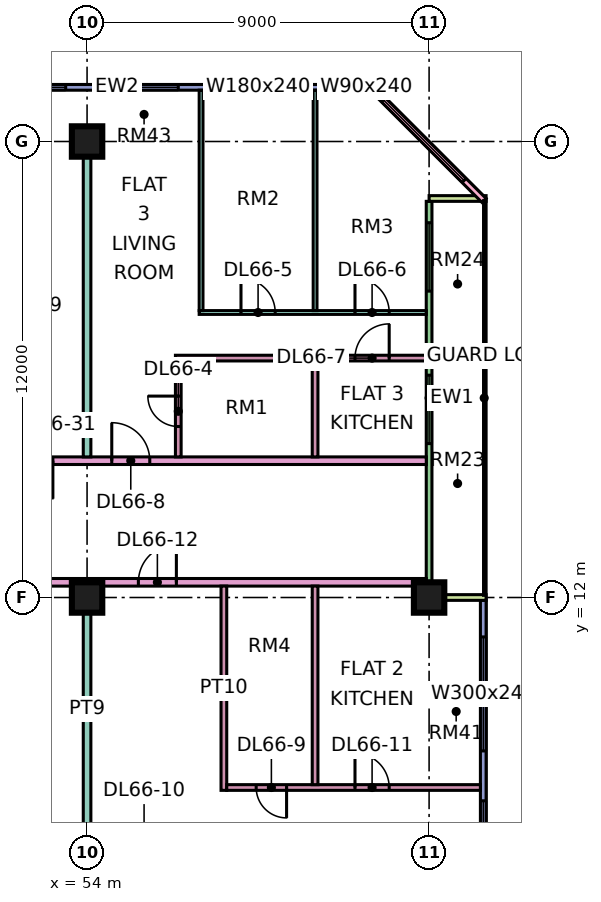
"""IFC4 building model, lengths in metres.
Left out: names, types, materials, properties, quantities, classifications, styles, units other than length and angle.
Written with IfcOpenShell. Run it as: python <this file> out.ifc"""

import sys

from ifc_helpers import new_model, si_unit, direction, frame, frame_2d, origin, origin_2d, place, context, subcontext, project, spatial, rectangle, extrude, element, fill, save


model = new_model("IFC4")
c1 = context("Model", 3, precision=1e-05, world=origin(), true_north=direction((0.0, 1.0)))
c2 = subcontext(c1, "Body", "Model", "MODEL_VIEW")
j1 = project(units=[si_unit("LENGTHUNIT", "METRE"), si_unit("PLANEANGLEUNIT", "RADIAN")], contexts=[c1])
p1 = place(None, origin())
s1 = spatial("IfcSite", under=j1, at=p1, CompositionType="ELEMENT")
p2 = place(p1, origin())
s2 = spatial("IfcBuilding", under=s1, at=p2, CompositionType="ELEMENT")
p3 = place(p2, frame((0.0, 0.0, 284.65)))
s3 = spatial("IfcBuildingStorey", under=s2, at=p3, CompositionType="ELEMENT", Elevation=284.65)
for number, where, z_axis, x_axis in (
    (1, (54.0, 12.0, 0.0), (0.0, 0.0, 1.0), (1.0, 0.0, 0.0)),
    (2, (54.0, 24.0, 0.0), (0.0, 0.0, 1.0), (1.0, 0.0, 0.0)),
    (3, (63.0, 12.0, 0.0), (0.0, 0.0, 1.0), (1.0, 0.0, 0.0)),
):
    element("IfcColumn", number, at=place(p3, frame(where, z_axis=z_axis, x_axis=x_axis)), inside=s3, PredefinedType="COLUMN", context=c2, shape_type="SweptSolid", body=[
        extrude(rectangle(XDim=0.8, YDim=0.8, at=origin_2d()), origin(), (0.0, 0.0, 1.0), 3.75),
    ])
p4 = place(p3, frame((61.5, 25.425, 0.0), z_axis=(0.0, 0.0, 1.0), x_axis=(-1.0, 0.0, 0.0)))
e4 = element("IfcWall", 4, at=p4, inside=s3, PredefinedType="SOLIDWALL", context=c2, shape_type="SweptSolid", body=[
    extrude(rectangle(XDim=13.425, YDim=0.15, at=frame_2d((6.712, 0.0))), origin(), (0.0, 0.0, 1.0), 3.35),
])
p5 = place(p4, frame((0.3, 0.0, 0.45)))
e5 = element("IfcOpeningElement", 5, at=p5, cuts=e4, PredefinedType="OPENING", context=c2, shape_type="SweptSolid", body=[
    extrude(rectangle(XDim=0.9, YDim=2.4, at=frame_2d((0.45, 1.2))), frame((0.0, 0.085, 0.0), z_axis=(0.0, -1.0, 0.0), x_axis=(1.0, 0.0, 0.0)), (0.0, 0.0, 1.0), 0.17),
])
p6 = place(p4, frame((2.1, 0.0, 0.45)))
e6 = element("IfcOpeningElement", 6, at=p6, cuts=e4, PredefinedType="OPENING", context=c2, shape_type="SweptSolid", body=[
    extrude(rectangle(XDim=1.8, YDim=2.4, at=frame_2d((0.9, 1.2))), frame((0.0, 0.085, 0.0), z_axis=(0.0, -1.0, 0.0), x_axis=(1.0, 0.0, 0.0)), (0.0, 0.0, 1.0), 0.17),
])
p7 = place(p4, frame((5.1, 0.0, 0.45)))
e7 = element("IfcOpeningElement", 7, at=p7, cuts=e4, PredefinedType="OPENING", context=c2, shape_type="SweptSolid", body=[
    extrude(rectangle(XDim=1.8, YDim=2.4, at=frame_2d((0.9, 1.2))), frame((0.0, 0.085, 0.0), z_axis=(0.0, -1.0, 0.0), x_axis=(1.0, 0.0, 0.0)), (0.0, 0.0, 1.0), 0.17),
])
p8 = place(p4, frame((8.062, 0.0, 0.45)))
e8 = element("IfcOpeningElement", 8, at=p8, cuts=e4, PredefinedType="OPENING", context=c2, shape_type="SweptSolid", body=[
    extrude(rectangle(XDim=4.8, YDim=2.4, at=frame_2d((2.4, 1.2))), frame((0.0, 0.085, 0.0), z_axis=(0.0, -1.0, 0.0), x_axis=(1.0, 0.0, 0.0)), (0.0, 0.0, 1.0), 0.17),
])
p9 = place(p3, frame((64.425, 1.5, 0.0), z_axis=(0.0, 0.0, 1.0), x_axis=(0.0, 1.0, 0.0)))
e9 = element("IfcWall", 9, at=p9, inside=s3, PredefinedType="SOLIDWALL", context=c2, shape_type="SweptSolid", body=[
    extrude(rectangle(XDim=10.425, YDim=0.15, at=frame_2d((5.212, 0.0))), origin(), (0.0, 0.0, 1.0), 3.35),
])
p10 = place(p9, frame((0.35, 0.0, 0.45)))
e10 = element("IfcOpeningElement", 10, at=p10, cuts=e9, PredefinedType="OPENING", context=c2, shape_type="SweptSolid", body=[
    extrude(rectangle(XDim=4.8, YDim=2.4, at=frame_2d((2.4, 1.2))), frame((0.0, 0.085, 0.0), z_axis=(0.0, -1.0, 0.0), x_axis=(1.0, 0.0, 0.0)), (0.0, 0.0, 1.0), 0.17),
])
p11 = place(p9, frame((6.462, 0.0, 0.45)))
e11 = element("IfcOpeningElement", 11, at=p11, cuts=e9, PredefinedType="OPENING", context=c2, shape_type="SweptSolid", body=[
    extrude(rectangle(XDim=3.0, YDim=2.4, at=frame_2d((1.5, 1.2))), frame((0.0, 0.085, 0.0), z_axis=(0.0, -1.0, 0.0), x_axis=(1.0, 0.0, 0.0)), (0.0, 0.0, 1.0), 0.17),
])
p12 = place(p3, frame((63.0, 12.075, 0.0), z_axis=(0.0, 0.0, 1.0), x_axis=(0.0, 1.0, 0.0)))
e12 = element("IfcWall", 12, at=p12, inside=s3, PredefinedType="SOLIDWALL", context=c2, shape_type="SweptSolid", body=[
    extrude(rectangle(XDim=10.35, YDim=0.15, at=frame_2d((5.175, 0.0))), origin(), (0.0, 0.0, 1.0), 3.35),
])
p13 = place(p12, frame((3.975, 0.0, 0.45)))
e13 = element("IfcOpeningElement", 13, at=p13, cuts=e12, PredefinedType="OPENING", context=c2, shape_type="SweptSolid", body=[
    extrude(rectangle(XDim=1.8, YDim=2.4, at=frame_2d((0.9, 1.2))), frame((0.0, 0.085, 0.0), z_axis=(0.0, -1.0, 0.0), x_axis=(1.0, 0.0, 0.0)), (0.0, 0.0, 1.0), 0.17),
])
p14 = place(p12, frame((7.988, 0.0, 0.45)))
e14 = element("IfcOpeningElement", 14, at=p14, cuts=e12, PredefinedType="OPENING", context=c2, shape_type="SweptSolid", body=[
    extrude(rectangle(XDim=1.8, YDim=2.4, at=frame_2d((0.9, 1.2))), frame((0.0, 0.085, 0.0), z_axis=(0.0, -1.0, 0.0), x_axis=(1.0, 0.0, 0.0)), (0.0, 0.0, 1.0), 0.17),
])
for number, where, z_axis, x_axis in (
    (15, (64.5, 12.0, 0.0), (0.0, 0.0, 1.0), (-1.0, 0.0, 0.0)),
    (16, (64.5, 22.5, 0.0), (0.0, 0.0, 1.0), (-1.0, 0.0, 0.0)),
):
    element("IfcWall", number, at=place(p3, frame(where, z_axis=z_axis, x_axis=x_axis)), inside=s3, PredefinedType="SOLIDWALL", context=c2, shape_type="SweptSolid", body=[
        extrude(rectangle(XDim=1.5, YDim=0.15, at=frame_2d((0.75, 0.0))), origin(), (0.0, 0.0, 1.0), 3.35),
    ])
p15 = place(p3, frame((64.447, 22.447, 0.0), z_axis=(0.0, 0.0, 1.0), x_axis=(-0.707106781187, 0.707106781187, 0.0)))
e17 = element("IfcWall", 17, at=p15, inside=s3, PredefinedType="SOLIDWALL", context=c2, shape_type="SweptSolid", body=[
    extrude(rectangle(XDim=4.243, YDim=0.15, at=frame_2d((2.121, 0.0))), origin(), (0.0, 0.0, 1.0), 3.35),
])
p16 = place(p15, frame((0.744, 0.0, 0.45)))
e18 = element("IfcOpeningElement", 18, at=p16, cuts=e17, PredefinedType="OPENING", context=c2, shape_type="SweptSolid", body=[
    extrude(rectangle(XDim=3.0, YDim=2.4, at=frame_2d((1.5, 1.2))), frame((0.0, 0.085, 0.0), z_axis=(0.0, -1.0, 0.0), x_axis=(1.0, 0.0, 0.0)), (0.0, 0.0, 1.0), 0.17),
])
p17 = place(p3, frame((40.65, 12.4, 0.0), z_axis=(0.0, 0.0, 1.0), x_axis=(1.0, 0.0, 0.0)))
e19 = element("IfcWall", 19, at=p17, inside=s3, PredefinedType="PARTITIONING", context=c2, shape_type="SweptSolid", body=[
    extrude(rectangle(XDim=22.276, YDim=0.2, at=frame_2d((11.138, 0.0))), origin(), (0.0, 0.0, 1.0), 3.35),
])
p18 = place(p17, frame((14.7, 0.0, 0.0)))
e20 = element("IfcOpeningElement", 20, at=p18, cuts=e19, PredefinedType="OPENING", context=c2, shape_type="SweptSolid", body=[
    extrude(rectangle(XDim=1.0, YDim=2.1, at=frame_2d((0.5, 1.05))), frame((0.0, 0.11, 0.0), z_axis=(0.0, -1.0, 0.0), x_axis=(1.0, 0.0, 0.0)), (0.0, 0.0, 1.0), 0.22),
])
p19 = place(p17, frame((1.05, 0.0, 0.0)))
e21 = element("IfcOpeningElement", 21, at=p19, cuts=e19, PredefinedType="OPENING", context=c2, shape_type="SweptSolid", body=[
    extrude(rectangle(XDim=1.0, YDim=2.1, at=frame_2d((0.5, 1.05))), frame((0.0, 0.11, 0.0), z_axis=(0.0, -1.0, 0.0), x_axis=(1.0, 0.0, 0.0)), (0.0, 0.0, 1.0), 0.22),
])
p20 = place(p3, frame((51.225, 15.6, 0.0), z_axis=(0.0, 0.0, 1.0), x_axis=(1.0, 0.0, 0.0)))
e22 = element("IfcWall", 22, at=p20, inside=s3, PredefinedType="PARTITIONING", context=c2, shape_type="SweptSolid", body=[
    extrude(rectangle(XDim=11.701, YDim=0.2, at=frame_2d((5.851, 0.0))), origin(), (0.0, 0.0, 1.0), 3.35),
])
p21 = place(p20, frame((3.425, 0.0, 0.0)))
e23 = element("IfcOpeningElement", 23, at=p21, cuts=e22, PredefinedType="OPENING", context=c2, shape_type="SweptSolid", body=[
    extrude(rectangle(XDim=1.0, YDim=2.1, at=frame_2d((0.5, 1.05))), frame((0.0, 0.11, 0.0), z_axis=(0.0, -1.0, 0.0), x_axis=(1.0, 0.0, 0.0)), (0.0, 0.0, 1.0), 0.22),
])
p22 = place(p20, frame((0.875, 0.0, 0.0)))
e24 = element("IfcOpeningElement", 24, at=p22, cuts=e22, PredefinedType="OPENING", context=c2, shape_type="SweptSolid", body=[
    extrude(rectangle(XDim=1.0, YDim=2.1, at=frame_2d((0.5, 1.05))), frame((0.0, 0.11, 0.0), z_axis=(0.0, -1.0, 0.0), x_axis=(1.0, 0.0, 0.0)), (0.0, 0.0, 1.0), 0.22),
])
p23 = place(p3, frame((54.0, 5.825, 0.0), z_axis=(0.0, 0.0, 1.0), x_axis=(0.0, 1.0, 0.0)))
e25 = element("IfcWall", 25, at=p23, inside=s3, PredefinedType="PARTITIONING", context=c2, shape_type="SweptSolid", body=[
    extrude(rectangle(XDim=6.475, YDim=0.2, at=frame_2d((3.238, 0.0))), origin(), (0.0, 0.0, 1.0), 3.35),
])
p24 = place(p3, frame((54.0, 15.7, 0.0), z_axis=(0.0, 0.0, 1.0), x_axis=(0.0, 1.0, 0.0)))
e26 = element("IfcWall", 26, at=p24, inside=s3, PredefinedType="PARTITIONING", context=c2, shape_type="SweptSolid", body=[
    extrude(rectangle(XDim=8.3, YDim=0.2, at=frame_2d((4.15, 0.0))), origin(), (0.0, 0.0, 1.0), 3.35),
])
p25 = place(p3, frame((56.325, 18.3, 0.0), z_axis=(0.0, 0.0, 1.0), x_axis=(1.0, 0.0, 0.0)))
e27 = element("IfcWall", 27, at=p25, inside=s3, PredefinedType="PARTITIONING", context=c2, shape_type="SweptSolid", body=[
    extrude(rectangle(XDim=6.601, YDim=0.15, at=frame_2d((3.301, 0.0))), origin(), (0.0, 0.0, 1.0), 3.35),
])
p26 = place(p25, frame((4.725, 0.0, 0.0)))
e28 = element("IfcOpeningElement", 28, at=p26, cuts=e27, PredefinedType="OPENING", context=c2, shape_type="SweptSolid", body=[
    extrude(rectangle(XDim=0.9, YDim=2.1, at=frame_2d((0.45, 1.05))), frame((0.0, 0.085, 0.0), z_axis=(0.0, -1.0, 0.0), x_axis=(1.0, 0.0, 0.0)), (0.0, 0.0, 1.0), 0.17),
])
p27 = place(p3, frame((56.4, 15.7, 0.0), z_axis=(0.0, 0.0, 1.0), x_axis=(0.0, 1.0, 0.0)))
e29 = element("IfcWall", 29, at=p27, inside=s3, PredefinedType="PARTITIONING", context=c2, shape_type="SweptSolid", body=[
    extrude(rectangle(XDim=2.525, YDim=0.15, at=frame_2d((1.263, 0.0))), origin(), (0.0, 0.0, 1.0), 3.35),
])
p28 = place(p27, frame((0.8, 0.0, 0.0)))
e30 = element("IfcOpeningElement", 30, at=p28, cuts=e29, PredefinedType="OPENING", context=c2, shape_type="SweptSolid", body=[
    extrude(rectangle(XDim=0.8, YDim=2.1, at=frame_2d((0.4, 1.05))), frame((0.0, 0.085, 0.0), z_axis=(0.0, -1.0, 0.0), x_axis=(1.0, 0.0, 0.0)), (0.0, 0.0, 1.0), 0.17),
])
p29 = place(p3, frame((56.95, 19.5, 0.0), z_axis=(0.0, 0.0, 1.0), x_axis=(1.0, 0.0, 0.0)))
e31 = element("IfcWall", 31, at=p29, inside=s3, PredefinedType="PARTITIONING", context=c2, shape_type="SweptSolid", body=[
    extrude(rectangle(XDim=5.976, YDim=0.1, at=frame_2d((2.988, 0.0))), origin(), (0.0, 0.0, 1.0), 3.35),
])
p30 = place(p29, frame((1.1, 0.0, 0.0)))
e32 = element("IfcOpeningElement", 32, at=p30, cuts=e31, PredefinedType="OPENING", context=c2, shape_type="SweptSolid", body=[
    extrude(rectangle(XDim=0.9, YDim=2.1, at=frame_2d((0.45, 1.05))), frame((0.0, 0.06, 0.0), z_axis=(0.0, -1.0, 0.0), x_axis=(1.0, 0.0, 0.0)), (0.0, 0.0, 1.0), 0.12),
])
p31 = place(p29, frame((4.1, 0.0, 0.0)))
e33 = element("IfcOpeningElement", 33, at=p31, cuts=e31, PredefinedType="OPENING", context=c2, shape_type="SweptSolid", body=[
    extrude(rectangle(XDim=0.9, YDim=2.1, at=frame_2d((0.45, 1.05))), frame((0.0, 0.06, 0.0), z_axis=(0.0, -1.0, 0.0), x_axis=(1.0, 0.0, 0.0)), (0.0, 0.0, 1.0), 0.12),
])
p32 = place(p3, frame((57.0, 19.55, 0.0), z_axis=(0.0, 0.0, 1.0), x_axis=(0.0, 1.0, 0.0)))
e34 = element("IfcWall", 34, at=p32, inside=s3, PredefinedType="PARTITIONING", context=c2, shape_type="SweptSolid", body=[
    extrude(rectangle(XDim=5.8, YDim=0.1, at=frame_2d((2.9, 0.0))), origin(), (0.0, 0.0, 1.0), 3.35),
])
p33 = place(p3, frame((57.6, 6.925, 0.0), z_axis=(0.0, 0.0, 1.0), x_axis=(0.0, 1.0, 0.0)))
e35 = element("IfcWall", 35, at=p33, inside=s3, PredefinedType="PARTITIONING", context=c2, shape_type="SweptSolid", body=[
    extrude(rectangle(XDim=5.375, YDim=0.15, at=frame_2d((2.688, 0.0))), origin(), (0.0, 0.0, 1.0), 3.35),
])
p34 = place(p3, frame((57.675, 7.0, 0.0), z_axis=(0.0, 0.0, 1.0), x_axis=(1.0, 0.0, 0.0)))
e36 = element("IfcWall", 36, at=p34, inside=s3, PredefinedType="PARTITIONING", context=c2, shape_type="SweptSolid", body=[
    extrude(rectangle(XDim=6.675, YDim=0.15, at=frame_2d((3.337, 0.0))), origin(), (0.0, 0.0, 1.0), 3.35),
])
p35 = place(p34, frame((0.775, 0.0, 0.0)))
e37 = element("IfcOpeningElement", 37, at=p35, cuts=e36, PredefinedType="OPENING", context=c2, shape_type="SweptSolid", body=[
    extrude(rectangle(XDim=0.8, YDim=2.1, at=frame_2d((0.4, 1.05))), frame((0.0, 0.085, 0.0), z_axis=(0.0, -1.0, 0.0), x_axis=(1.0, 0.0, 0.0)), (0.0, 0.0, 1.0), 0.17),
])
p36 = place(p34, frame((3.375, 0.0, 0.0)))
e38 = element("IfcOpeningElement", 38, at=p36, cuts=e36, PredefinedType="OPENING", context=c2, shape_type="SweptSolid", body=[
    extrude(rectangle(XDim=0.9, YDim=2.1, at=frame_2d((0.45, 1.05))), frame((0.0, 0.085, 0.0), z_axis=(0.0, -1.0, 0.0), x_axis=(1.0, 0.0, 0.0)), (0.0, 0.0, 1.0), 0.17),
])
p37 = place(p3, frame((60.0, 7.075, 0.0), z_axis=(0.0, 0.0, 1.0), x_axis=(0.0, 1.0, 0.0)))
e39 = element("IfcWall", 39, at=p37, inside=s3, PredefinedType="PARTITIONING", context=c2, shape_type="SweptSolid", body=[
    extrude(rectangle(XDim=5.225, YDim=0.15, at=frame_2d((2.613, 0.0))), origin(), (0.0, 0.0, 1.0), 3.35),
])
p38 = place(p3, frame((60.0, 15.7, 0.0), z_axis=(0.0, 0.0, 1.0), x_axis=(0.0, 1.0, 0.0)))
e40 = element("IfcWall", 40, at=p38, inside=s3, PredefinedType="PARTITIONING", context=c2, shape_type="SweptSolid", body=[
    extrude(rectangle(XDim=2.525, YDim=0.15, at=frame_2d((1.263, 0.0))), origin(), (0.0, 0.0, 1.0), 3.35),
])
p39 = place(p3, frame((60.0, 19.55, 0.0), z_axis=(0.0, 0.0, 1.0), x_axis=(0.0, 1.0, 0.0)))
e41 = element("IfcWall", 41, at=p39, inside=s3, PredefinedType="PARTITIONING", context=c2, shape_type="SweptSolid", body=[
    extrude(rectangle(XDim=5.801, YDim=0.1, at=frame_2d((2.9, 0.0))), origin(), (0.0, 0.0, 1.0), 3.35),
])
p40 = place(p5, origin())
e42 = element("IfcWindow", 42, at=p40, inside=s3, PartitioningType="SINGLE_PANEL", PredefinedType="WINDOW", context=c2, shape_type="SweptSolid", body=[
    extrude(rectangle(XDim=0.9, YDim=2.4, at=frame_2d((0.45, 1.2))), frame((0.0, 0.03, 0.0), z_axis=(0.0, -1.0, 0.0), x_axis=(1.0, 0.0, 0.0)), (0.0, 0.0, 1.0), 0.06),
])
fill(e5, e42)
p41 = place(p6, origin())
e43 = element("IfcWindow", 43, at=p41, inside=s3, PartitioningType="SINGLE_PANEL", PredefinedType="WINDOW", context=c2, shape_type="SweptSolid", body=[
    extrude(rectangle(XDim=1.8, YDim=2.4, at=frame_2d((0.9, 1.2))), frame((0.0, 0.03, 0.0), z_axis=(0.0, -1.0, 0.0), x_axis=(1.0, 0.0, 0.0)), (0.0, 0.0, 1.0), 0.06),
])
fill(e6, e43)
p42 = place(p7, origin())
e44 = element("IfcWindow", 44, at=p42, inside=s3, PartitioningType="SINGLE_PANEL", PredefinedType="WINDOW", context=c2, shape_type="SweptSolid", body=[
    extrude(rectangle(XDim=1.8, YDim=2.4, at=frame_2d((0.9, 1.2))), frame((0.0, 0.03, 0.0), z_axis=(0.0, -1.0, 0.0), x_axis=(1.0, 0.0, 0.0)), (0.0, 0.0, 1.0), 0.06),
])
fill(e7, e44)
p43 = place(p8, origin())
e45 = element("IfcWindow", 45, at=p43, inside=s3, PartitioningType="SINGLE_PANEL", PredefinedType="WINDOW", context=c2, shape_type="SweptSolid", body=[
    extrude(rectangle(XDim=4.8, YDim=2.4, at=frame_2d((2.4, 1.2))), frame((0.0, 0.03, 0.0), z_axis=(0.0, -1.0, 0.0), x_axis=(1.0, 0.0, 0.0)), (0.0, 0.0, 1.0), 0.06),
])
fill(e8, e45)
p44 = place(p10, origin())
e46 = element("IfcWindow", 46, at=p44, inside=s3, PartitioningType="SINGLE_PANEL", PredefinedType="WINDOW", context=c2, shape_type="SweptSolid", body=[
    extrude(rectangle(XDim=4.8, YDim=2.4, at=frame_2d((2.4, 1.2))), frame((0.0, 0.03, 0.0), z_axis=(0.0, -1.0, 0.0), x_axis=(1.0, 0.0, 0.0)), (0.0, 0.0, 1.0), 0.06),
])
fill(e10, e46)
p45 = place(p11, origin())
e47 = element("IfcWindow", 47, at=p45, inside=s3, PartitioningType="SINGLE_PANEL", PredefinedType="WINDOW", context=c2, shape_type="SweptSolid", body=[
    extrude(rectangle(XDim=3.0, YDim=2.4, at=frame_2d((1.5, 1.2))), frame((0.0, 0.03, 0.0), z_axis=(0.0, -1.0, 0.0), x_axis=(1.0, 0.0, 0.0)), (0.0, 0.0, 1.0), 0.06),
])
fill(e11, e47)
p46 = place(p13, origin())
e48 = element("IfcWindow", 48, at=p46, inside=s3, PartitioningType="SINGLE_PANEL", PredefinedType="WINDOW", context=c2, shape_type="SweptSolid", body=[
    extrude(rectangle(XDim=1.8, YDim=2.4, at=frame_2d((0.9, 1.2))), frame((0.0, 0.03, 0.0), z_axis=(0.0, -1.0, 0.0), x_axis=(1.0, 0.0, 0.0)), (0.0, 0.0, 1.0), 0.06),
])
fill(e13, e48)
p47 = place(p14, origin())
e49 = element("IfcWindow", 49, at=p47, inside=s3, PartitioningType="SINGLE_PANEL", PredefinedType="WINDOW", context=c2, shape_type="SweptSolid", body=[
    extrude(rectangle(XDim=1.8, YDim=2.4, at=frame_2d((0.9, 1.2))), frame((0.0, 0.03, 0.0), z_axis=(0.0, -1.0, 0.0), x_axis=(1.0, 0.0, 0.0)), (0.0, 0.0, 1.0), 0.06),
])
fill(e14, e49)
p48 = place(p16, origin())
e50 = element("IfcWindow", 50, at=p48, inside=s3, PartitioningType="SINGLE_PANEL", PredefinedType="WINDOW", context=c2, shape_type="SweptSolid", body=[
    extrude(rectangle(XDim=3.0, YDim=2.4, at=frame_2d((1.5, 1.2))), frame((0.0, 0.03, 0.0), z_axis=(0.0, -1.0, 0.0), x_axis=(1.0, 0.0, 0.0)), (0.0, 0.0, 1.0), 0.06),
])
fill(e18, e50)
p49 = place(p28, frame((0.8, 0.0, 0.0), z_axis=(0.0, 0.0, 1.0), x_axis=(-1.0, 0.0, 0.0)))
e51 = element("IfcDoor", 51, at=p49, inside=s3, OperationType="SINGLE_SWING_RIGHT", PredefinedType="DOOR", context=c2, shape_type="SweptSolid", body=[
    extrude(rectangle(XDim=0.8, YDim=2.1, at=frame_2d((0.4, 1.05))), frame((0.0, 0.025, 0.0), z_axis=(0.0, -1.0, 0.0), x_axis=(1.0, 0.0, 0.0)), (0.0, 0.0, 1.0), 0.05),
])
fill(e30, e51)
p50 = place(p30, origin())
e52 = element("IfcDoor", 52, at=p50, inside=s3, OperationType="SINGLE_SWING_LEFT", PredefinedType="DOOR", context=c2, shape_type="SweptSolid", body=[
    extrude(rectangle(XDim=0.9, YDim=2.1, at=frame_2d((0.45, 1.05))), frame((0.0, 0.025, 0.0), z_axis=(0.0, -1.0, 0.0), x_axis=(1.0, 0.0, 0.0)), (0.0, 0.0, 1.0), 0.05),
])
fill(e32, e52)
p51 = place(p31, origin())
e53 = element("IfcDoor", 53, at=p51, inside=s3, OperationType="SINGLE_SWING_LEFT", PredefinedType="DOOR", context=c2, shape_type="SweptSolid", body=[
    extrude(rectangle(XDim=0.9, YDim=2.1, at=frame_2d((0.45, 1.05))), frame((0.0, 0.025, 0.0), z_axis=(0.0, -1.0, 0.0), x_axis=(1.0, 0.0, 0.0)), (0.0, 0.0, 1.0), 0.05),
])
fill(e33, e53)
p52 = place(p26, frame((0.9, 0.0, 0.0), z_axis=(0.0, 0.0, 1.0), x_axis=(-1.0, 0.0, 0.0)))
e54 = element("IfcDoor", 54, at=p52, inside=s3, OperationType="SINGLE_SWING_RIGHT", PredefinedType="DOOR", context=c2, shape_type="SweptSolid", body=[
    extrude(rectangle(XDim=0.9, YDim=2.1, at=frame_2d((0.45, 1.05))), frame((0.0, 0.025, 0.0), z_axis=(0.0, -1.0, 0.0), x_axis=(1.0, 0.0, 0.0)), (0.0, 0.0, 1.0), 0.05),
])
fill(e28, e54)
p53 = place(p21, origin())
e55 = element("IfcDoor", 55, at=p53, inside=s3, OperationType="SINGLE_SWING_LEFT", PredefinedType="DOOR", context=c2, shape_type="SweptSolid", body=[
    extrude(rectangle(XDim=1.0, YDim=2.1, at=frame_2d((0.5, 1.05))), frame((0.0, 0.025, 0.0), z_axis=(0.0, -1.0, 0.0), x_axis=(1.0, 0.0, 0.0)), (0.0, 0.0, 1.0), 0.05),
])
fill(e23, e55)
p54 = place(p35, origin())
e56 = element("IfcDoor", 56, at=p54, inside=s3, OperationType="SINGLE_SWING_RIGHT", PredefinedType="DOOR", context=c2, shape_type="SweptSolid", body=[
    extrude(rectangle(XDim=0.8, YDim=2.1, at=frame_2d((0.4, 1.05))), frame((0.0, 0.025, 0.0), z_axis=(0.0, -1.0, 0.0), x_axis=(1.0, 0.0, 0.0)), (0.0, 0.0, 1.0), 0.05),
])
fill(e37, e56)
p55 = place(p36, origin())
e57 = element("IfcDoor", 57, at=p55, inside=s3, OperationType="SINGLE_SWING_LEFT", PredefinedType="DOOR", context=c2, shape_type="SweptSolid", body=[
    extrude(rectangle(XDim=0.9, YDim=2.1, at=frame_2d((0.45, 1.05))), frame((0.0, 0.025, 0.0), z_axis=(0.0, -1.0, 0.0), x_axis=(1.0, 0.0, 0.0)), (0.0, 0.0, 1.0), 0.05),
])
fill(e38, e57)
p56 = place(p18, frame((1.0, 0.0, 0.0), z_axis=(0.0, 0.0, 1.0), x_axis=(-1.0, 0.0, 0.0)))
e58 = element("IfcDoor", 58, at=p56, inside=s3, OperationType="SINGLE_SWING_RIGHT", PredefinedType="DOOR", context=c2, shape_type="SweptSolid", body=[
    extrude(rectangle(XDim=1.0, YDim=2.1, at=frame_2d((0.5, 1.05))), frame((0.0, 0.025, 0.0), z_axis=(0.0, -1.0, 0.0), x_axis=(1.0, 0.0, 0.0)), (0.0, 0.0, 1.0), 0.05),
])
fill(e20, e58)
p57 = place(p22, origin())
e59 = element("IfcDoor", 59, at=p57, inside=s3, OperationType="SINGLE_SWING_RIGHT", PredefinedType="DOOR", context=c2, shape_type="SweptSolid", body=[
    extrude(rectangle(XDim=1.0, YDim=2.1, at=frame_2d((0.5, 1.05))), frame((0.0, 0.025, 0.0), z_axis=(0.0, -1.0, 0.0), x_axis=(1.0, 0.0, 0.0)), (0.0, 0.0, 1.0), 0.05),
])
fill(e24, e59)
save(model, sys.argv[1])
